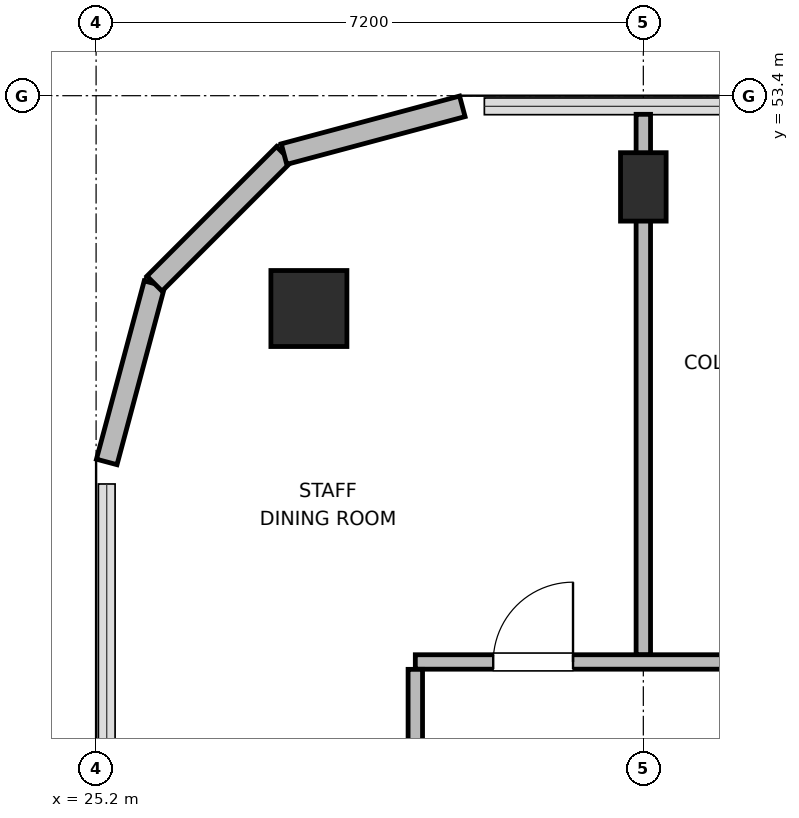
"""IFC4 building model, lengths in metres.
Left out: names, types, materials, properties, quantities, classifications, styles, units other than length and angle.
Written with IfcOpenShell. Run it as: python <this file> out.ifc"""

import sys

from ifc_helpers import new_model, si_unit, direction, frame, frame_2d, origin, origin_2d, place, context, subcontext, project, spatial, rectangle, circle, extrude, element, fill, save


model = new_model("IFC4")
c1 = context("Model", 3, precision=1e-05, world=origin(), true_north=direction((0.0, 1.0)))
c2 = subcontext(c1, "Body", "Model", "MODEL_VIEW")
j1 = project(units=[si_unit("LENGTHUNIT", "METRE"), si_unit("PLANEANGLEUNIT", "RADIAN")], contexts=[c1])
p1 = place(None, origin())
s1 = spatial("IfcSite", under=j1, at=p1, CompositionType="ELEMENT")
p2 = place(p1, origin())
s2 = spatial("IfcBuilding", under=s1, at=p2, CompositionType="ELEMENT")
p3 = place(p2, frame((0.0, 0.0, 346.5)))
s3 = spatial("IfcBuildingStorey", under=s2, at=p3, CompositionType="ELEMENT", Elevation=346.5)
p4 = place(p3, frame((28.0, 50.6, 0.0), z_axis=(0.0, 0.0, 1.0), x_axis=(1.0, 0.0, 0.0)))
e1 = element("IfcColumn", 1, at=p4, inside=s3, PredefinedType="COLUMN", context=c2, shape_type="SweptSolid", body=[
    extrude(circle(Radius=0.5, at=origin_2d()), origin(), (0.0, 0.0, 1.0), 3.9),
])
p5 = place(p3, frame((32.4, 52.2, 0.0), z_axis=(0.0, 0.0, 1.0), x_axis=(1.0, 0.0, 0.0)))
e2 = element("IfcColumn", 2, at=p5, inside=s3, PredefinedType="COLUMN", context=c2, shape_type="SweptSolid", body=[
    extrude(rectangle(XDim=0.6, YDim=0.9, at=origin_2d()), origin(), (0.0, 0.0, 1.0), 3.9),
])
p6 = place(p3, frame((25.34, 48.582, 0.0), z_axis=(0.0, 0.0, 1.0), x_axis=(0.258751159445, 0.965944013639, 0.0)))
e3 = element("IfcWall", 3, at=p6, inside=s3, PredefinedType="SOLIDWALL", context=c2, shape_type="SweptSolid", body=[
    extrude(rectangle(XDim=2.429, YDim=0.28, at=frame_2d((1.214, 0.0))), origin(), (0.0, 0.0, 1.0), 3.68),
])
p7 = place(p3, frame((25.969, 50.927, 0.0), z_axis=(0.0, 0.0, 1.0), x_axis=(0.707106781187, 0.707106781187, 0.0)))
e4 = element("IfcWall", 4, at=p7, inside=s3, PredefinedType="SOLIDWALL", context=c2, shape_type="SweptSolid", body=[
    extrude(rectangle(XDim=2.41, YDim=0.28, at=frame_2d((1.205, 0.0))), origin(), (0.0, 0.0, 1.0), 3.68),
])
p8 = place(p3, frame((27.673, 52.632, 0.0), z_axis=(0.0, 0.0, 1.0), x_axis=(0.965937282298, 0.25877628691, 0.0)))
e5 = element("IfcWall", 5, at=p8, inside=s3, PredefinedType="SOLIDWALL", context=c2, shape_type="SweptSolid", body=[
    extrude(rectangle(XDim=2.428, YDim=0.28, at=frame_2d((1.214, 0.0))), origin(), (0.0, 0.0, 1.0), 3.68),
])
p9 = place(p3, frame((29.4, 45.95, 0.0), z_axis=(0.0, 0.0, 1.0), x_axis=(1.0, 0.0, 0.0)))
e6 = element("IfcWall", 6, at=p9, inside=s3, PredefinedType="PLUMBINGWALL", context=c2, shape_type="SweptSolid", body=[
    extrude(rectangle(XDim=37.4, YDim=0.19, at=frame_2d((18.7, 0.0))), origin(), (0.0, 0.0, 1.0), 3.68),
])
p10 = place(p9, frame((1.025, 0.0, 0.0)))
e7 = element("IfcOpeningElement", 7, at=p10, cuts=e6, PredefinedType="OPENING", context=c2, shape_type="SweptSolid", body=[
    extrude(rectangle(XDim=1.05, YDim=2.04, at=frame_2d((0.525, 1.02))), frame((0.0, 0.105, 0.0), z_axis=(0.0, -1.0, 0.0), x_axis=(1.0, 0.0, 0.0)), (0.0, 0.0, 1.0), 0.21),
])
p11 = place(p9, frame((4.125, 0.0, 0.0)))
e8 = element("IfcOpeningElement", 8, at=p11, cuts=e6, PredefinedType="OPENING", context=c2, shape_type="SweptSolid", body=[
    extrude(rectangle(XDim=1.05, YDim=2.04, at=frame_2d((0.525, 1.02))), frame((0.0, 0.105, 0.0), z_axis=(0.0, -1.0, 0.0), x_axis=(1.0, 0.0, 0.0)), (0.0, 0.0, 1.0), 0.21),
])
p12 = place(p9, frame((7.325, 0.0, 0.0)))
e9 = element("IfcOpeningElement", 9, at=p12, cuts=e6, PredefinedType="OPENING", context=c2, shape_type="SweptSolid", body=[
    extrude(rectangle(XDim=1.05, YDim=2.04, at=frame_2d((0.525, 1.02))), frame((0.0, 0.105, 0.0), z_axis=(0.0, -1.0, 0.0), x_axis=(1.0, 0.0, 0.0)), (0.0, 0.0, 1.0), 0.21),
])
p13 = place(p9, frame((10.525, 0.0, 0.0)))
e10 = element("IfcOpeningElement", 10, at=p13, cuts=e6, PredefinedType="OPENING", context=c2, shape_type="SweptSolid", body=[
    extrude(rectangle(XDim=1.05, YDim=2.04, at=frame_2d((0.525, 1.02))), frame((0.0, 0.105, 0.0), z_axis=(0.0, -1.0, 0.0), x_axis=(1.0, 0.0, 0.0)), (0.0, 0.0, 1.0), 0.21),
])
p14 = place(p9, frame((13.925, 0.0, 0.0)))
e11 = element("IfcOpeningElement", 11, at=p14, cuts=e6, PredefinedType="OPENING", context=c2, shape_type="SweptSolid", body=[
    extrude(rectangle(XDim=1.05, YDim=2.04, at=frame_2d((0.525, 1.02))), frame((0.0, 0.105, 0.0), z_axis=(0.0, -1.0, 0.0), x_axis=(1.0, 0.0, 0.0)), (0.0, 0.0, 1.0), 0.21),
])
p15 = place(p9, frame((20.125, 0.0, 0.0)))
e12 = element("IfcOpeningElement", 12, at=p15, cuts=e6, PredefinedType="OPENING", context=c2, shape_type="SweptSolid", body=[
    extrude(rectangle(XDim=1.05, YDim=2.04, at=frame_2d((0.525, 1.02))), frame((0.0, 0.105, 0.0), z_axis=(0.0, -1.0, 0.0), x_axis=(1.0, 0.0, 0.0)), (0.0, 0.0, 1.0), 0.21),
])
p16 = place(p9, frame((26.125, 0.0, 0.0)))
e13 = element("IfcOpeningElement", 13, at=p16, cuts=e6, PredefinedType="OPENING", context=c2, shape_type="SweptSolid", body=[
    extrude(rectangle(XDim=1.05, YDim=2.04, at=frame_2d((0.525, 1.02))), frame((0.0, 0.105, 0.0), z_axis=(0.0, -1.0, 0.0), x_axis=(1.0, 0.0, 0.0)), (0.0, 0.0, 1.0), 0.21),
])
p17 = place(p9, frame((29.325, 0.0, 0.0)))
e14 = element("IfcOpeningElement", 14, at=p17, cuts=e6, PredefinedType="OPENING", context=c2, shape_type="SweptSolid", body=[
    extrude(rectangle(XDim=1.05, YDim=2.04, at=frame_2d((0.525, 1.02))), frame((0.0, 0.105, 0.0), z_axis=(0.0, -1.0, 0.0), x_axis=(1.0, 0.0, 0.0)), (0.0, 0.0, 1.0), 0.21),
])
p18 = place(p9, frame((33.925, 0.0, 0.0)))
e15 = element("IfcOpeningElement", 15, at=p18, cuts=e6, PredefinedType="OPENING", context=c2, shape_type="SweptSolid", body=[
    extrude(rectangle(XDim=1.05, YDim=2.04, at=frame_2d((0.525, 1.02))), frame((0.0, 0.105, 0.0), z_axis=(0.0, -1.0, 0.0), x_axis=(1.0, 0.0, 0.0)), (0.0, 0.0, 1.0), 0.21),
])
p19 = place(p3, frame((29.4, 26.147, 0.0), z_axis=(0.0, 0.0, 1.0), x_axis=(0.0, 1.0, 0.0)))
e16 = element("IfcWall", 16, at=p19, inside=s3, PredefinedType="PLUMBINGWALL", context=c2, shape_type="SweptSolid", body=[
    extrude(rectangle(XDim=19.706, YDim=0.19, at=frame_2d((9.853, 0.0))), origin(), (0.0, 0.0, 1.0), 3.68),
])
p20 = place(p19, frame((1.903, 0.0, 0.0)))
e17 = element("IfcOpeningElement", 17, at=p20, cuts=e16, PredefinedType="OPENING", context=c2, shape_type="SweptSolid", body=[
    extrude(rectangle(XDim=1.05, YDim=2.04, at=frame_2d((0.525, 1.02))), frame((0.0, 0.105, 0.0), z_axis=(0.0, -1.0, 0.0), x_axis=(1.0, 0.0, 0.0)), (0.0, 0.0, 1.0), 0.21),
])
p21 = place(p19, frame((6.878, 0.0, 0.0)))
e18 = element("IfcOpeningElement", 18, at=p21, cuts=e16, PredefinedType="OPENING", context=c2, shape_type="SweptSolid", body=[
    extrude(rectangle(XDim=1.05, YDim=2.04, at=frame_2d((0.525, 1.02))), frame((0.0, 0.105, 0.0), z_axis=(0.0, -1.0, 0.0), x_axis=(1.0, 0.0, 0.0)), (0.0, 0.0, 1.0), 0.21),
])
p22 = place(p19, frame((11.878, 0.0, 0.0)))
e19 = element("IfcOpeningElement", 19, at=p22, cuts=e16, PredefinedType="OPENING", context=c2, shape_type="SweptSolid", body=[
    extrude(rectangle(XDim=1.05, YDim=2.04, at=frame_2d((0.525, 1.02))), frame((0.0, 0.105, 0.0), z_axis=(0.0, -1.0, 0.0), x_axis=(1.0, 0.0, 0.0)), (0.0, 0.0, 1.0), 0.21),
])
p23 = place(p19, frame((16.853, 0.0, 0.0)))
e20 = element("IfcOpeningElement", 20, at=p23, cuts=e16, PredefinedType="OPENING", context=c2, shape_type="SweptSolid", body=[
    extrude(rectangle(XDim=1.05, YDim=2.04, at=frame_2d((0.525, 1.02))), frame((0.0, 0.105, 0.0), z_axis=(0.0, -1.0, 0.0), x_axis=(1.0, 0.0, 0.0)), (0.0, 0.0, 1.0), 0.21),
])
p24 = place(p3, frame((32.4, 46.047, 0.0), z_axis=(0.0, 0.0, 1.0), x_axis=(0.0, 1.0, 0.0)))
e21 = element("IfcWall", 21, at=p24, inside=s3, PredefinedType="PLUMBINGWALL", context=c2, shape_type="SweptSolid", body=[
    extrude(rectangle(XDim=7.108, YDim=0.19, at=frame_2d((3.554, 0.0))), origin(), (0.0, 0.0, 1.0), 3.054),
])
p25 = place(p10, origin())
e22 = element("IfcDoor", 22, at=p25, inside=s3, OperationType="SINGLE_SWING_RIGHT", PredefinedType="DOOR", context=c2, shape_type="SweptSolid", body=[
    extrude(rectangle(XDim=1.05, YDim=2.04, at=frame_2d((0.525, 1.02))), frame((0.0, 0.025, 0.0), z_axis=(0.0, -1.0, 0.0), x_axis=(1.0, 0.0, 0.0)), (0.0, 0.0, 1.0), 0.05),
])
fill(e7, e22)
save(model, sys.argv[1])
